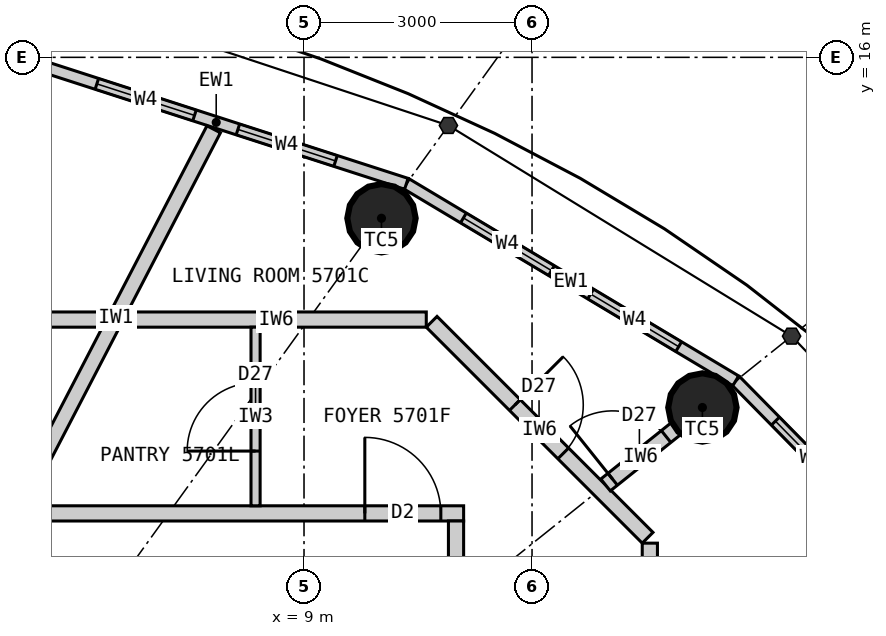
"""IFC4 building model, lengths in metres.
Left out: names, types, materials, properties, quantities, classifications, styles, units other than length and angle.
Written with IfcOpenShell. Run it as: python <this file> out.ifc"""

import sys

from ifc_helpers import new_model, si_unit, direction, frame, frame_2d, origin, origin_2d, place, context, subcontext, project, spatial, rectangle, circle, extrude, element, fill, save


model = new_model("IFC4")
c1 = context("Model", 3, precision=1e-05, world=origin(), true_north=direction((0.0, 1.0)))
c2 = subcontext(c1, "Body", "Model", "MODEL_VIEW")
j1 = project(units=[si_unit("LENGTHUNIT", "METRE"), si_unit("PLANEANGLEUNIT", "RADIAN")], contexts=[c1])
p1 = place(None, origin())
s1 = spatial("IfcSite", under=j1, at=p1, CompositionType="ELEMENT")
p2 = place(p1, origin())
s2 = spatial("IfcBuilding", under=s1, at=p2, CompositionType="ELEMENT")
p3 = place(p2, frame((0.0, 0.0, 212.7)))
s3 = spatial("IfcBuildingStorey", under=s2, at=p3, CompositionType="ELEMENT", Elevation=212.7)
for number, where, z_axis, x_axis in (
    (1, (14.241, 11.393, 0.0), (0.0, 0.0, 1.0), (1.0, 0.0, 0.0)),
    (2, (10.019, 13.883, 0.0), (0.0, 0.0, 1.0), (1.0, 0.0, 0.0)),
):
    element("IfcColumn", number, at=place(p3, frame(where, z_axis=z_axis, x_axis=x_axis)), inside=s3, PredefinedType="COLUMN", context=c2, shape_type="SweptSolid", body=[
        extrude(circle(Radius=0.45, at=origin_2d()), origin(), (0.0, 0.0, 1.0), 3.3),
    ])
p4 = place(p3, frame((18.04, 8.332, 0.0), z_axis=(0.0, 0.0, 1.0), x_axis=(-0.701527379618, 0.712642501993, 0.0)))
e3 = element("IfcWall", 3, at=p4, inside=s3, PredefinedType="ELEMENTEDWALL", context=c2, shape_type="SweptSolid", body=[
    extrude(rectangle(XDim=4.788, YDim=0.15, at=frame_2d((2.394, 0.0))), origin(), (0.0, 0.0, 1.0), 3.12),
])
p5 = place(p4, frame((0.744, 0.0, 0.9)))
e4 = element("IfcOpeningElement", 4, at=p5, cuts=e3, PredefinedType="OPENING", context=c2, shape_type="SweptSolid", body=[
    extrude(rectangle(XDim=1.35, YDim=1.9, at=frame_2d((0.675, 0.95))), frame((0.0, 0.085, 0.0), z_axis=(0.0, -1.0, 0.0), x_axis=(1.0, 0.0, 0.0)), (0.0, 0.0, 1.0), 0.17),
])
p6 = place(p4, frame((2.694, 0.0, 0.9)))
e5 = element("IfcOpeningElement", 5, at=p6, cuts=e3, PredefinedType="OPENING", context=c2, shape_type="SweptSolid", body=[
    extrude(rectangle(XDim=1.35, YDim=1.9, at=frame_2d((0.675, 0.95))), frame((0.0, 0.085, 0.0), z_axis=(0.0, -1.0, 0.0), x_axis=(1.0, 0.0, 0.0)), (0.0, 0.0, 1.0), 0.17),
])
p7 = place(p3, frame((14.68, 11.744, 0.0), z_axis=(0.0, 0.0, 1.0), x_axis=(-0.85822150553, 0.513279502265, 0.0)))
e6 = element("IfcWall", 6, at=p7, inside=s3, PredefinedType="ELEMENTEDWALL", context=c2, shape_type="SweptSolid", body=[
    extrude(rectangle(XDim=5.05, YDim=0.15, at=frame_2d((2.525, 0.0))), origin(), (0.0, 0.0, 1.0), 3.12),
])
p8 = place(p7, frame((0.875, 0.0, 0.9)))
e7 = element("IfcOpeningElement", 7, at=p8, cuts=e6, PredefinedType="OPENING", context=c2, shape_type="SweptSolid", body=[
    extrude(rectangle(XDim=1.35, YDim=1.9, at=frame_2d((0.675, 0.95))), frame((0.0, 0.085, 0.0), z_axis=(0.0, -1.0, 0.0), x_axis=(1.0, 0.0, 0.0)), (0.0, 0.0, 1.0), 0.17),
])
p9 = place(p7, frame((2.825, 0.0, 0.9)))
e8 = element("IfcOpeningElement", 8, at=p9, cuts=e6, PredefinedType="OPENING", context=c2, shape_type="SweptSolid", body=[
    extrude(rectangle(XDim=1.35, YDim=1.9, at=frame_2d((0.675, 0.95))), frame((0.0, 0.085, 0.0), z_axis=(0.0, -1.0, 0.0), x_axis=(1.0, 0.0, 0.0)), (0.0, 0.0, 1.0), 0.17),
])
p10 = place(p3, frame((10.346, 14.336, 0.0), z_axis=(0.0, 0.0, 1.0), x_axis=(-0.951644702515, 0.307200846638, 0.0)))
e9 = element("IfcWall", 9, at=p10, inside=s3, PredefinedType="ELEMENTEDWALL", context=c2, shape_type="SweptSolid", body=[
    extrude(rectangle(XDim=5.258, YDim=0.15, at=frame_2d((2.629, 0.0))), origin(), (0.0, 0.0, 1.0), 3.12),
])
p11 = place(p10, frame((0.979, 0.0, 0.9)))
e10 = element("IfcOpeningElement", 10, at=p11, cuts=e9, PredefinedType="OPENING", context=c2, shape_type="SweptSolid", body=[
    extrude(rectangle(XDim=1.35, YDim=1.9, at=frame_2d((0.675, 0.95))), frame((0.0, 0.085, 0.0), z_axis=(0.0, -1.0, 0.0), x_axis=(1.0, 0.0, 0.0)), (0.0, 0.0, 1.0), 0.17),
])
p12 = place(p10, frame((2.929, 0.0, 0.9)))
e11 = element("IfcOpeningElement", 11, at=p12, cuts=e9, PredefinedType="OPENING", context=c2, shape_type="SweptSolid", body=[
    extrude(rectangle(XDim=1.35, YDim=1.9, at=frame_2d((0.675, 0.95))), frame((0.0, 0.085, 0.0), z_axis=(0.0, -1.0, 0.0), x_axis=(1.0, 0.0, 0.0)), (0.0, 0.0, 1.0), 0.17),
])
p13 = place(p3, frame((-11.1, 10.0, 0.0), z_axis=(0.0, 0.0, 1.0), x_axis=(1.0, 0.0, 0.0)))
e12 = element("IfcWall", 12, at=p13, inside=s3, PredefinedType="PARTITIONING", context=c2, shape_type="SweptSolid", body=[
    extrude(rectangle(XDim=22.2, YDim=0.2, at=frame_2d((11.1, 0.0))), origin(), (0.0, 0.0, 1.0), 3.12),
])
p14 = place(p13, frame((20.9, 0.0, 0.0)))
e13 = element("IfcOpeningElement", 13, at=p14, cuts=e12, PredefinedType="OPENING", context=c2, shape_type="SweptSolid", body=[
    extrude(rectangle(XDim=1.0, YDim=2.2, at=frame_2d((0.5, 1.1))), frame((0.0, 0.11, 0.0), z_axis=(0.0, -1.0, 0.0), x_axis=(1.0, 0.0, 0.0)), (0.0, 0.0, 1.0), 0.22),
])
p15 = place(p13, frame((4.329, 0.0, 0.0)))
e14 = element("IfcOpeningElement", 14, at=p15, cuts=e12, PredefinedType="OPENING", context=c2, shape_type="SweptSolid", body=[
    extrude(rectangle(XDim=1.0, YDim=2.2, at=frame_2d((0.5, 1.1))), frame((0.0, 0.11, 0.0), z_axis=(0.0, -1.0, 0.0), x_axis=(1.0, 0.0, 0.0)), (0.0, 0.0, 1.0), 0.22),
])
p16 = place(p3, frame((11.0, -9.9, 0.0), z_axis=(0.0, 0.0, 1.0), x_axis=(0.0, 1.0, 0.0)))
e15 = element("IfcWall", 15, at=p16, inside=s3, PredefinedType="PARTITIONING", context=c2, shape_type="SweptSolid", body=[
    extrude(rectangle(XDim=19.8, YDim=0.2, at=frame_2d((9.9, 0.0))), origin(), (0.0, 0.0, 1.0), 3.12),
])
p17 = place(p3, frame((5.241, 10.1, 0.0), z_axis=(0.0, 0.0, 1.0), x_axis=(0.460603196597, 0.887606160008, 0.0)))
e16 = element("IfcWall", 16, at=p17, inside=s3, PredefinedType="PARTITIONING", context=c2, shape_type="SweptSolid", body=[
    extrude(rectangle(XDim=5.58, YDim=0.2, at=frame_2d((2.79, 0.0))), origin(), (0.0, 0.0, 1.0), 3.12),
])
p18 = place(p3, frame((13.55, 1.525, 0.0), z_axis=(0.0, 0.0, 1.0), x_axis=(0.0, 1.0, 0.0)))
e17 = element("IfcWall", 17, at=p18, inside=s3, PredefinedType="PARTITIONING", context=c2, shape_type="SweptSolid", body=[
    extrude(rectangle(XDim=8.084, YDim=0.2, at=frame_2d((4.042, 0.0))), origin(), (0.0, 0.0, 1.0), 3.12),
])
p19 = place(p18, frame((1.597, 0.0, 0.0)))
e18 = element("IfcOpeningElement", 18, at=p19, cuts=e17, PredefinedType="OPENING", context=c2, shape_type="SweptSolid", body=[
    extrude(rectangle(XDim=0.8, YDim=2.1, at=frame_2d((0.4, 1.05))), frame((0.0, 0.11, 0.0), z_axis=(0.0, -1.0, 0.0), x_axis=(1.0, 0.0, 0.0)), (0.0, 0.0, 1.0), 0.22),
])
p20 = place(p18, frame((3.57, 0.0, 0.0)))
e19 = element("IfcOpeningElement", 19, at=p20, cuts=e17, PredefinedType="OPENING", context=c2, shape_type="SweptSolid", body=[
    extrude(rectangle(XDim=0.9, YDim=2.1, at=frame_2d((0.45, 1.05))), frame((0.0, 0.11, 0.0), z_axis=(0.0, -1.0, 0.0), x_axis=(1.0, 0.0, 0.0)), (0.0, 0.0, 1.0), 0.22),
])
p21 = place(p3, frame((13.521, 9.679, 0.0), z_axis=(0.0, 0.0, 1.0), x_axis=(-0.707106781187, 0.707106781187, 0.0)))
e20 = element("IfcWall", 20, at=p21, inside=s3, PredefinedType="PARTITIONING", context=c2, shape_type="SweptSolid", body=[
    extrude(rectangle(XDim=4.019, YDim=0.2, at=frame_2d((2.009, 0.0))), origin(), (0.0, 0.0, 1.0), 3.12),
])
p22 = place(p21, frame((1.57, 0.0, 0.0)))
e21 = element("IfcOpeningElement", 21, at=p22, cuts=e20, PredefinedType="OPENING", context=c2, shape_type="SweptSolid", body=[
    extrude(rectangle(XDim=0.9, YDim=2.1, at=frame_2d((0.45, 1.05))), frame((0.0, 0.11, 0.0), z_axis=(0.0, -1.0, 0.0), x_axis=(1.0, 0.0, 0.0)), (0.0, 0.0, 1.0), 0.22),
])
p23 = place(p3, frame((10.609, 12.55, 0.0), z_axis=(0.0, 0.0, 1.0), x_axis=(-1.0, 0.0, 0.0)))
e22 = element("IfcWall", 22, at=p23, inside=s3, PredefinedType="PARTITIONING", context=c2, shape_type="SweptSolid", body=[
    extrude(rectangle(XDim=3.947, YDim=0.2, at=frame_2d((1.974, 0.0))), origin(), (0.0, 0.0, 1.0), 3.12),
])
p24 = place(p3, frame((12.968, 10.374, 0.0), z_axis=(0.0, 0.0, 1.0), x_axis=(0.780888968944, 0.624669847345, 0.0)))
e23 = element("IfcWall", 23, at=p24, inside=s3, PredefinedType="PARTITIONING", context=c2, shape_type="SweptSolid", body=[
    extrude(rectangle(XDim=1.181, YDim=0.2, at=frame_2d((0.591, 0.0))), origin(), (0.0, 0.0, 1.0), 2.42),
])
p25 = place(p24, frame((0.12, 0.0, 0.0)))
e24 = element("IfcOpeningElement", 24, at=p25, cuts=e23, PredefinedType="OPENING", context=c2, shape_type="SweptSolid", body=[
    extrude(rectangle(XDim=0.9, YDim=2.1, at=frame_2d((0.45, 1.05))), frame((0.0, 0.11, 0.0), z_axis=(0.0, -1.0, 0.0), x_axis=(1.0, 0.0, 0.0)), (0.0, 0.0, 1.0), 0.22),
])
p26 = place(p3, frame((8.363, 10.1, 0.0), z_axis=(0.0, 0.0, 1.0), x_axis=(0.0, 1.0, 0.0)))
e25 = element("IfcWall", 25, at=p26, inside=s3, PredefinedType="PARTITIONING", context=c2, shape_type="SweptSolid", body=[
    extrude(rectangle(XDim=2.35, YDim=0.12, at=frame_2d((1.175, 0.0))), origin(), (0.0, 0.0, 1.0), 3.12),
])
p27 = place(p26, frame((0.72, 0.0, 0.0)))
e26 = element("IfcOpeningElement", 26, at=p27, cuts=e25, PredefinedType="OPENING", context=c2, shape_type="SweptSolid", body=[
    extrude(rectangle(XDim=0.9, YDim=2.1, at=frame_2d((0.45, 1.05))), frame((0.0, 0.07, 0.0), z_axis=(0.0, -1.0, 0.0), x_axis=(1.0, 0.0, 0.0)), (0.0, 0.0, 1.0), 0.14),
])
p28 = place(p3, frame((6.364, 12.55, 0.0), z_axis=(0.0, 0.0, 1.0), x_axis=(-1.0, 0.0, 0.0)))
e27 = element("IfcWall", 27, at=p28, inside=s3, PredefinedType="PARTITIONING", context=c2, shape_type="SweptSolid", body=[
    extrude(rectangle(XDim=16.972, YDim=0.2, at=frame_2d((8.486, 0.0))), origin(), (0.0, 0.0, 1.0), 3.12),
])
p29 = place(p28, frame((2.525, 0.0, 0.0)))
e28 = element("IfcOpeningElement", 28, at=p29, cuts=e27, PredefinedType="OPENING", context=c2, shape_type="SweptSolid", body=[
    extrude(rectangle(XDim=0.8, YDim=2.1, at=frame_2d((0.4, 1.05))), frame((0.0, 0.11, 0.0), z_axis=(0.0, -1.0, 0.0), x_axis=(1.0, 0.0, 0.0)), (0.0, 0.0, 1.0), 0.22),
])
p30 = place(p28, frame((4.145, 0.0, 0.0)))
e29 = element("IfcOpeningElement", 29, at=p30, cuts=e27, PredefinedType="OPENING", context=c2, shape_type="SweptSolid", body=[
    extrude(rectangle(XDim=0.9, YDim=2.1, at=frame_2d((0.45, 1.05))), frame((0.0, 0.11, 0.0), z_axis=(0.0, -1.0, 0.0), x_axis=(1.0, 0.0, 0.0)), (0.0, 0.0, 1.0), 0.22),
])
p31 = place(p28, frame((13.52, 0.0, 0.0)))
e30 = element("IfcOpeningElement", 30, at=p31, cuts=e27, PredefinedType="OPENING", context=c2, shape_type="SweptSolid", body=[
    extrude(rectangle(XDim=0.9, YDim=2.1, at=frame_2d((0.45, 1.05))), frame((0.0, 0.11, 0.0), z_axis=(0.0, -1.0, 0.0), x_axis=(1.0, 0.0, 0.0)), (0.0, 0.0, 1.0), 0.22),
])
p32 = place(p6, origin())
e31 = element("IfcWindow", 31, at=p32, inside=s3, PartitioningType="SINGLE_PANEL", PredefinedType="WINDOW", context=c2, shape_type="SweptSolid", body=[
    extrude(rectangle(XDim=1.35, YDim=1.9, at=frame_2d((0.675, 0.95))), frame((0.0, 0.03, 0.0), z_axis=(0.0, -1.0, 0.0), x_axis=(1.0, 0.0, 0.0)), (0.0, 0.0, 1.0), 0.06),
])
fill(e5, e31)
p33 = place(p8, origin())
e32 = element("IfcWindow", 32, at=p33, inside=s3, PartitioningType="SINGLE_PANEL", PredefinedType="WINDOW", context=c2, shape_type="SweptSolid", body=[
    extrude(rectangle(XDim=1.35, YDim=1.9, at=frame_2d((0.675, 0.95))), frame((0.0, 0.03, 0.0), z_axis=(0.0, -1.0, 0.0), x_axis=(1.0, 0.0, 0.0)), (0.0, 0.0, 1.0), 0.06),
])
fill(e7, e32)
p34 = place(p9, origin())
e33 = element("IfcWindow", 33, at=p34, inside=s3, PartitioningType="SINGLE_PANEL", PredefinedType="WINDOW", context=c2, shape_type="SweptSolid", body=[
    extrude(rectangle(XDim=1.35, YDim=1.9, at=frame_2d((0.675, 0.95))), frame((0.0, 0.03, 0.0), z_axis=(0.0, -1.0, 0.0), x_axis=(1.0, 0.0, 0.0)), (0.0, 0.0, 1.0), 0.06),
])
fill(e8, e33)
p35 = place(p11, origin())
e34 = element("IfcWindow", 34, at=p35, inside=s3, PartitioningType="SINGLE_PANEL", PredefinedType="WINDOW", context=c2, shape_type="SweptSolid", body=[
    extrude(rectangle(XDim=1.35, YDim=1.9, at=frame_2d((0.675, 0.95))), frame((0.0, 0.03, 0.0), z_axis=(0.0, -1.0, 0.0), x_axis=(1.0, 0.0, 0.0)), (0.0, 0.0, 1.0), 0.06),
])
fill(e10, e34)
p36 = place(p12, origin())
e35 = element("IfcWindow", 35, at=p36, inside=s3, PartitioningType="SINGLE_PANEL", PredefinedType="WINDOW", context=c2, shape_type="SweptSolid", body=[
    extrude(rectangle(XDim=1.35, YDim=1.9, at=frame_2d((0.675, 0.95))), frame((0.0, 0.03, 0.0), z_axis=(0.0, -1.0, 0.0), x_axis=(1.0, 0.0, 0.0)), (0.0, 0.0, 1.0), 0.06),
])
fill(e11, e35)
p37 = place(p14, origin())
e36 = element("IfcDoor", 36, at=p37, inside=s3, OperationType="SINGLE_SWING_LEFT", PredefinedType="DOOR", context=c2, shape_type="SweptSolid", body=[
    extrude(rectangle(XDim=1.0, YDim=2.2, at=frame_2d((0.5, 1.1))), frame((0.0, 0.025, 0.0), z_axis=(0.0, -1.0, 0.0), x_axis=(1.0, 0.0, 0.0)), (0.0, 0.0, 1.0), 0.05),
])
fill(e13, e36)
p38 = place(p27, origin())
e37 = element("IfcDoor", 37, at=p38, inside=s3, OperationType="SINGLE_SWING_LEFT", PredefinedType="DOOR", context=c2, shape_type="SweptSolid", body=[
    extrude(rectangle(XDim=0.9, YDim=2.1, at=frame_2d((0.45, 1.05))), frame((0.0, 0.025, 0.0), z_axis=(0.0, -1.0, 0.0), x_axis=(1.0, 0.0, 0.0)), (0.0, 0.0, 1.0), 0.05),
])
fill(e26, e37)
p39 = place(p22, origin())
e38 = element("IfcDoor", 38, at=p39, inside=s3, OperationType="SINGLE_SWING_RIGHT", PredefinedType="DOOR", context=c2, shape_type="SweptSolid", body=[
    extrude(rectangle(XDim=0.9, YDim=2.1, at=frame_2d((0.45, 1.05))), frame((0.0, 0.025, 0.0), z_axis=(0.0, -1.0, 0.0), x_axis=(1.0, 0.0, 0.0)), (0.0, 0.0, 1.0), 0.05),
])
fill(e21, e38)
p40 = place(p25, origin())
e39 = element("IfcDoor", 39, at=p40, inside=s3, OperationType="SINGLE_SWING_LEFT", PredefinedType="DOOR", context=c2, shape_type="SweptSolid", body=[
    extrude(rectangle(XDim=0.9, YDim=2.1, at=frame_2d((0.45, 1.05))), frame((0.0, 0.025, 0.0), z_axis=(0.0, -1.0, 0.0), x_axis=(1.0, 0.0, 0.0)), (0.0, 0.0, 1.0), 0.05),
])
fill(e24, e39)
save(model, sys.argv[1])
